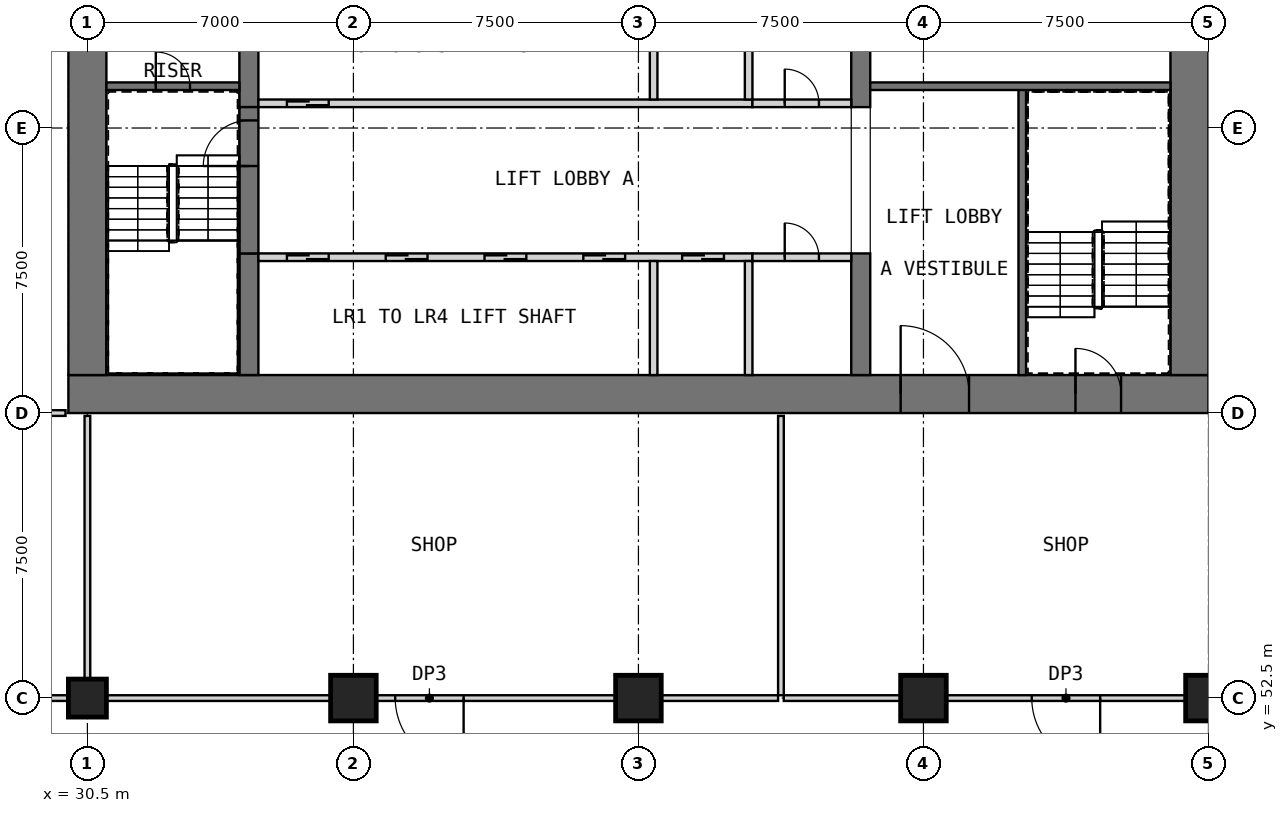
"""IFC4 building model, lengths in metres.
Left out: names, types, materials, properties, quantities, classifications, styles, units other than length and angle.
Written with IfcOpenShell. Run it as: python <this file> out.ifc"""

import sys

from ifc_helpers import new_model, si_unit, direction, frame, frame_2d, origin, origin_2d, place, context, subcontext, project, spatial, rectangle, extrude, element, fill, save


model = new_model("IFC4")
c1 = context("Model", 3, precision=1e-05, world=origin(), true_north=direction((0.0, 1.0)))
c2 = subcontext(c1, "Body", "Model", "MODEL_VIEW")
j1 = project(units=[si_unit("LENGTHUNIT", "METRE"), si_unit("PLANEANGLEUNIT", "RADIAN")], contexts=[c1])
p1 = place(None, origin())
s1 = spatial("IfcSite", under=j1, at=p1, CompositionType="ELEMENT")
p2 = place(p1, origin())
s2 = spatial("IfcBuilding", under=s1, at=p2, CompositionType="ELEMENT")
p3 = place(p2, frame((0.0, 0.0, 8.0)))
s3 = spatial("IfcBuildingStorey", under=s2, at=p3, CompositionType="ELEMENT", Elevation=8.0)
p4 = place(p3, frame((30.5, 52.5, 0.0), z_axis=(0.0, 0.0, 1.0), x_axis=(1.0, 0.0, 0.0)))
e1 = element("IfcColumn", 1, at=p4, inside=s3, PredefinedType="COLUMN", context=c2, shape_type="SweptSolid", body=[
    extrude(rectangle(XDim=1.0, YDim=1.0, at=origin_2d()), origin(), (0.0, 0.0, 1.0), 5.5),
])
for number, where, z_axis, x_axis in (
    (2, (37.5, 52.5, 0.0), (0.0, 0.0, 1.0), (1.0, 0.0, 0.0)),
    (3, (45.0, 52.5, 0.0), (0.0, 0.0, 1.0), (1.0, 0.0, 0.0)),
    (4, (52.5, 52.5, 0.0), (0.0, 0.0, 1.0), (1.0, 0.0, 0.0)),
    (5, (60.0, 52.5, 0.0), (0.0, 0.0, 1.0), (1.0, 0.0, 0.0)),
):
    element("IfcColumn", number, at=place(p3, frame(where, z_axis=z_axis, x_axis=x_axis)), inside=s3, PredefinedType="COLUMN", context=c2, shape_type="SweptSolid", body=[
        extrude(rectangle(XDim=1.2, YDim=1.2, at=origin_2d()), origin(), (0.0, 0.0, 1.0), 5.5),
    ])
p5 = place(p3, frame((30.0, 60.5, 0.0), z_axis=(0.0, 0.0, 1.0), x_axis=(1.0, 0.0, 0.0)))
e6 = element("IfcWall", 6, at=p5, inside=s3, PredefinedType="SHEAR", context=c2, shape_type="SweptSolid", body=[
    extrude(rectangle(XDim=30.0, YDim=1.0, at=frame_2d((15.0, 0.0))), origin(), (0.0, 0.0, 1.0), 5.5),
])
p6 = place(p5, frame((21.9, 0.0, 0.0)))
e7 = element("IfcOpeningElement", 7, at=p6, cuts=e6, PredefinedType="OPENING", context=c2, shape_type="SweptSolid", body=[
    extrude(rectangle(XDim=1.8, YDim=2.1, at=frame_2d((0.9, 1.05))), frame((0.0, 0.51, 0.0), z_axis=(0.0, -1.0, 0.0), x_axis=(1.0, 0.0, 0.0)), (0.0, 0.0, 1.0), 1.02),
])
p7 = place(p5, frame((26.5, 0.0, 0.0)))
e8 = element("IfcOpeningElement", 8, at=p7, cuts=e6, PredefinedType="OPENING", context=c2, shape_type="SweptSolid", body=[
    extrude(rectangle(XDim=1.2, YDim=2.1, at=frame_2d((0.6, 1.05))), frame((0.0, 0.51, 0.0), z_axis=(0.0, -1.0, 0.0), x_axis=(1.0, 0.0, 0.0)), (0.0, 0.0, 1.0), 1.02),
])
p8 = place(p3, frame((30.5, 61.0, 0.0), z_axis=(0.0, 0.0, 1.0), x_axis=(0.0, 1.0, 0.0)))
e9 = element("IfcWall", 9, at=p8, inside=s3, PredefinedType="SHEAR", context=c2, shape_type="SweptSolid", body=[
    extrude(rectangle(XDim=20.5, YDim=1.0, at=frame_2d((10.25, 0.0))), origin(), (0.0, 0.0, 1.0), 5.5),
])
p9 = place(p3, frame((59.5, 61.0, 0.0), z_axis=(0.0, 0.0, 1.0), x_axis=(0.0, 1.0, 0.0)))
e10 = element("IfcWall", 10, at=p9, inside=s3, PredefinedType="SHEAR", context=c2, shape_type="SweptSolid", body=[
    extrude(rectangle(XDim=20.5, YDim=1.0, at=frame_2d((10.25, 0.0))), origin(), (0.0, 0.0, 1.0), 5.5),
])
p10 = place(p9, frame((14.5, 0.0, 0.0)))
e11 = element("IfcOpeningElement", 11, at=p10, cuts=e10, PredefinedType="OPENING", context=c2, shape_type="SweptSolid", body=[
    extrude(rectangle(XDim=1.8, YDim=2.1, at=frame_2d((0.9, 1.05))), frame((0.0, 0.51, 0.0), z_axis=(0.0, -1.0, 0.0), x_axis=(1.0, 0.0, 0.0)), (0.0, 0.0, 1.0), 1.02),
])
p11 = place(p3, frame((34.75, 61.0, 0.0), z_axis=(0.0, 0.0, 1.0), x_axis=(0.0, 1.0, 0.0)))
e12 = element("IfcWall", 12, at=p11, inside=s3, PredefinedType="SHEAR", context=c2, shape_type="SweptSolid", body=[
    extrude(rectangle(XDim=3.2, YDim=0.5, at=frame_2d((1.6, 0.0))), origin(), (0.0, 0.0, 1.0), 5.5),
])
p12 = place(p3, frame((34.75, 68.05, 0.0), z_axis=(0.0, 0.0, 1.0), x_axis=(0.0, 1.0, 0.0)))
e13 = element("IfcWall", 13, at=p12, inside=s3, PredefinedType="SHEAR", context=c2, shape_type="SweptSolid", body=[
    extrude(rectangle(XDim=6.4, YDim=0.5, at=frame_2d((3.2, 0.0))), origin(), (0.0, 0.0, 1.0), 5.5),
])
p13 = place(p3, frame((50.85, 61.0, 0.0), z_axis=(0.0, 0.0, 1.0), x_axis=(0.0, 1.0, 0.0)))
e14 = element("IfcWall", 14, at=p13, inside=s3, PredefinedType="SHEAR", context=c2, shape_type="SweptSolid", body=[
    extrude(rectangle(XDim=3.2, YDim=0.5, at=frame_2d((1.6, 0.0))), origin(), (0.0, 0.0, 1.0), 5.5),
])
p14 = place(p3, frame((50.85, 68.05, 0.0), z_axis=(0.0, 0.0, 1.0), x_axis=(0.0, 1.0, 0.0)))
e15 = element("IfcWall", 15, at=p14, inside=s3, PredefinedType="SHEAR", context=c2, shape_type="SweptSolid", body=[
    extrude(rectangle(XDim=6.4, YDim=0.5, at=frame_2d((3.2, 0.0))), origin(), (0.0, 0.0, 1.0), 5.5),
])
p15 = place(p3, frame((35.0, 64.1, 0.0), z_axis=(0.0, 0.0, 1.0), x_axis=(1.0, 0.0, 0.0)))
e16 = element("IfcWall", 16, at=p15, inside=s3, PredefinedType="SOLIDWALL", context=c2, shape_type="SweptSolid", body=[
    extrude(rectangle(XDim=13.0, YDim=0.2, at=frame_2d((6.5, 0.0))), origin(), (0.0, 0.0, 1.0), 5.5),
])
p16 = place(p15, frame((0.75, 0.0, 0.0)))
e17 = element("IfcOpeningElement", 17, at=p16, cuts=e16, PredefinedType="OPENING", context=c2, shape_type="SweptSolid", body=[
    extrude(rectangle(XDim=1.1, YDim=2.1, at=frame_2d((0.55, 1.05))), frame((0.0, 0.11, 0.0), z_axis=(0.0, -1.0, 0.0), x_axis=(1.0, 0.0, 0.0)), (0.0, 0.0, 1.0), 0.22),
])
p17 = place(p15, frame((3.35, 0.0, 0.0)))
e18 = element("IfcOpeningElement", 18, at=p17, cuts=e16, PredefinedType="OPENING", context=c2, shape_type="SweptSolid", body=[
    extrude(rectangle(XDim=1.1, YDim=2.1, at=frame_2d((0.55, 1.05))), frame((0.0, 0.11, 0.0), z_axis=(0.0, -1.0, 0.0), x_axis=(1.0, 0.0, 0.0)), (0.0, 0.0, 1.0), 0.22),
])
p18 = place(p15, frame((5.95, 0.0, 0.0)))
e19 = element("IfcOpeningElement", 19, at=p18, cuts=e16, PredefinedType="OPENING", context=c2, shape_type="SweptSolid", body=[
    extrude(rectangle(XDim=1.1, YDim=2.1, at=frame_2d((0.55, 1.05))), frame((0.0, 0.11, 0.0), z_axis=(0.0, -1.0, 0.0), x_axis=(1.0, 0.0, 0.0)), (0.0, 0.0, 1.0), 0.22),
])
p19 = place(p15, frame((8.55, 0.0, 0.0)))
e20 = element("IfcOpeningElement", 20, at=p19, cuts=e16, PredefinedType="OPENING", context=c2, shape_type="SweptSolid", body=[
    extrude(rectangle(XDim=1.1, YDim=2.1, at=frame_2d((0.55, 1.05))), frame((0.0, 0.11, 0.0), z_axis=(0.0, -1.0, 0.0), x_axis=(1.0, 0.0, 0.0)), (0.0, 0.0, 1.0), 0.22),
])
p20 = place(p15, frame((11.15, 0.0, 0.0)))
e21 = element("IfcOpeningElement", 21, at=p20, cuts=e16, PredefinedType="OPENING", context=c2, shape_type="SweptSolid", body=[
    extrude(rectangle(XDim=1.1, YDim=2.1, at=frame_2d((0.55, 1.05))), frame((0.0, 0.11, 0.0), z_axis=(0.0, -1.0, 0.0), x_axis=(1.0, 0.0, 0.0)), (0.0, 0.0, 1.0), 0.22),
])
for number, where, z_axis, x_axis in (
    (22, (45.4, 61.0, 0.0), (0.0, 0.0, 1.0), (0.0, 1.0, 0.0)),
    (23, (47.9, 61.0, 0.0), (0.0, 0.0, 1.0), (0.0, 1.0, 0.0)),
):
    element("IfcWall", number, at=place(p3, frame(where, z_axis=z_axis, x_axis=x_axis)), inside=s3, PredefinedType="SOLIDWALL", context=c2, shape_type="SweptSolid", body=[
        extrude(rectangle(XDim=3.0, YDim=0.2, at=frame_2d((1.5, 0.0))), origin(), (0.0, 0.0, 1.0), 5.5),
    ])
p21 = place(p3, frame((48.0, 64.1, 0.0), z_axis=(0.0, 0.0, 1.0), x_axis=(1.0, 0.0, 0.0)))
e24 = element("IfcWall", 24, at=p21, inside=s3, PredefinedType="PARTITIONING", context=c2, shape_type="SweptSolid", body=[
    extrude(rectangle(XDim=2.6, YDim=0.2, at=frame_2d((1.3, 0.0))), origin(), (0.0, 0.0, 1.0), 5.2),
])
p22 = place(p21, frame((0.85, 0.0, 0.0)))
e25 = element("IfcOpeningElement", 25, at=p22, cuts=e24, PredefinedType="OPENING", context=c2, shape_type="SweptSolid", body=[
    extrude(rectangle(XDim=0.9, YDim=2.1, at=frame_2d((0.45, 1.05))), frame((0.0, 0.11, 0.0), z_axis=(0.0, -1.0, 0.0), x_axis=(1.0, 0.0, 0.0)), (0.0, 0.0, 1.0), 0.22),
])
p23 = place(p3, frame((35.0, 68.15, 0.0), z_axis=(0.0, 0.0, 1.0), x_axis=(1.0, 0.0, 0.0)))
e26 = element("IfcWall", 26, at=p23, inside=s3, PredefinedType="SOLIDWALL", context=c2, shape_type="SweptSolid", body=[
    extrude(rectangle(XDim=13.0, YDim=0.2, at=frame_2d((6.5, 0.0))), origin(), (0.0, 0.0, 1.0), 5.5),
])
p24 = place(p23, frame((0.75, 0.0, 0.0)))
e27 = element("IfcOpeningElement", 27, at=p24, cuts=e26, PredefinedType="OPENING", context=c2, shape_type="SweptSolid", body=[
    extrude(rectangle(XDim=1.1, YDim=2.1, at=frame_2d((0.55, 1.05))), frame((0.0, 0.11, 0.0), z_axis=(0.0, -1.0, 0.0), x_axis=(1.0, 0.0, 0.0)), (0.0, 0.0, 1.0), 0.22),
])
for number, where, z_axis, x_axis in (
    (28, (45.4, 68.25, 0.0), (0.0, 0.0, 1.0), (0.0, 1.0, 0.0)),
    (29, (47.9, 68.25, 0.0), (0.0, 0.0, 1.0), (0.0, 1.0, 0.0)),
):
    element("IfcWall", number, at=place(p3, frame(where, z_axis=z_axis, x_axis=x_axis)), inside=s3, PredefinedType="SOLIDWALL", context=c2, shape_type="SweptSolid", body=[
        extrude(rectangle(XDim=2.75, YDim=0.2, at=frame_2d((1.375, 0.0))), origin(), (0.0, 0.0, 1.0), 5.5),
    ])
p25 = place(p3, frame((48.0, 68.15, 0.0), z_axis=(0.0, 0.0, 1.0), x_axis=(1.0, 0.0, 0.0)))
e30 = element("IfcWall", 30, at=p25, inside=s3, PredefinedType="PARTITIONING", context=c2, shape_type="SweptSolid", body=[
    extrude(rectangle(XDim=2.6, YDim=0.2, at=frame_2d((1.3, 0.0))), origin(), (0.0, 0.0, 1.0), 5.2),
])
p26 = place(p25, frame((0.85, 0.0, 0.0)))
e31 = element("IfcOpeningElement", 31, at=p26, cuts=e30, PredefinedType="OPENING", context=c2, shape_type="SweptSolid", body=[
    extrude(rectangle(XDim=0.9, YDim=2.1, at=frame_2d((0.45, 1.05))), frame((0.0, 0.11, 0.0), z_axis=(0.0, -1.0, 0.0), x_axis=(1.0, 0.0, 0.0)), (0.0, 0.0, 1.0), 0.22),
])
p27 = place(p3, frame((34.75, 64.2, 0.0), z_axis=(0.0, 0.0, 1.0), x_axis=(0.0, 1.0, 0.0)))
e32 = element("IfcWall", 32, at=p27, inside=s3, PredefinedType="SOLIDWALL", context=c2, shape_type="SweptSolid", body=[
    extrude(rectangle(XDim=3.85, YDim=0.5, at=frame_2d((1.925, 0.0))), origin(), (0.0, 0.0, 1.0), 4.3),
])
p28 = place(p27, frame((2.3, 0.0, 0.0)))
e33 = element("IfcOpeningElement", 33, at=p28, cuts=e32, PredefinedType="OPENING", context=c2, shape_type="SweptSolid", body=[
    extrude(rectangle(XDim=1.2, YDim=2.1, at=frame_2d((0.6, 1.05))), frame((0.0, 0.26, 0.0), z_axis=(0.0, -1.0, 0.0), x_axis=(1.0, 0.0, 0.0)), (0.0, 0.0, 1.0), 0.52),
])
p29 = place(p3, frame((31.0, 68.6, 0.0), z_axis=(0.0, 0.0, 1.0), x_axis=(1.0, 0.0, 0.0)))
e34 = element("IfcWall", 34, at=p29, inside=s3, PredefinedType="SOLIDWALL", context=c2, shape_type="SweptSolid", body=[
    extrude(rectangle(XDim=3.5, YDim=0.2, at=frame_2d((1.75, 0.0))), origin(), (0.0, 0.0, 1.0), 5.2),
])
p30 = place(p29, frame((1.3, 0.0, 0.0)))
e35 = element("IfcOpeningElement", 35, at=p30, cuts=e34, PredefinedType="OPENING", context=c2, shape_type="SweptSolid", body=[
    extrude(rectangle(XDim=0.9, YDim=2.1, at=frame_2d((0.45, 1.05))), frame((0.0, 0.11, 0.0), z_axis=(0.0, -1.0, 0.0), x_axis=(1.0, 0.0, 0.0)), (0.0, 0.0, 1.0), 0.22),
])
p31 = place(p3, frame((55.1, 61.0, 0.0), z_axis=(0.0, 0.0, 1.0), x_axis=(0.0, 1.0, 0.0)))
e36 = element("IfcWall", 36, at=p31, inside=s3, PredefinedType="SOLIDWALL", context=c2, shape_type="SweptSolid", body=[
    extrude(rectangle(XDim=7.6, YDim=0.2, at=frame_2d((3.8, 0.0))), origin(), (0.0, 0.0, 1.0), 5.2),
])
p32 = place(p3, frame((51.1, 68.6, 0.0), z_axis=(0.0, 0.0, 1.0), x_axis=(1.0, 0.0, 0.0)))
e37 = element("IfcWall", 37, at=p32, inside=s3, PredefinedType="SOLIDWALL", context=c2, shape_type="SweptSolid", body=[
    extrude(rectangle(XDim=7.9, YDim=0.2, at=frame_2d((3.95, 0.0))), origin(), (0.0, 0.0, 1.0), 5.2),
])
p33 = place(p3, frame((23.6, 52.5, 0.0), z_axis=(0.0, 0.0, 1.0), x_axis=(1.0, 0.0, 0.0)))
e38 = element("IfcWall", 38, at=p33, inside=s3, PredefinedType="PARTITIONING", context=c2, shape_type="SweptSolid", body=[
    extrude(rectangle(XDim=6.4, YDim=0.15, at=frame_2d((3.2, 0.0))), origin(), (0.0, 0.0, 1.0), 5.2),
])
p34 = place(p3, frame((31.0, 52.5, 0.0), z_axis=(0.0, 0.0, 1.0), x_axis=(1.0, 0.0, 0.0)))
e39 = element("IfcWall", 39, at=p34, inside=s3, PredefinedType="PARTITIONING", context=c2, shape_type="SweptSolid", body=[
    extrude(rectangle(XDim=5.9, YDim=0.15, at=frame_2d((2.95, 0.0))), origin(), (0.0, 0.0, 1.0), 5.2),
])
p35 = place(p3, frame((44.4, 52.5, 0.0), z_axis=(0.0, 0.0, 1.0), x_axis=(-1.0, 0.0, 0.0)))
e40 = element("IfcWall", 40, at=p35, inside=s3, PredefinedType="PARTITIONING", context=c2, shape_type="SweptSolid", body=[
    extrude(rectangle(XDim=6.3, YDim=0.15, at=frame_2d((3.15, 0.0))), origin(), (0.0, 0.0, 1.0), 5.2),
])
p36 = place(p35, frame((4.0, 0.0, 0.0)))
e41 = element("IfcOpeningElement", 41, at=p36, cuts=e40, PredefinedType="OPENING", context=c2, shape_type="SweptSolid", body=[
    extrude(rectangle(XDim=1.8, YDim=2.4, at=frame_2d((0.9, 1.2))), frame((0.0, 0.085, 0.0), z_axis=(0.0, -1.0, 0.0), x_axis=(1.0, 0.0, 0.0)), (0.0, 0.0, 1.0), 0.17),
])
for number, where, z_axis, x_axis in (
    (42, (45.6, 52.5, 0.0), (0.0, 0.0, 1.0), (1.0, 0.0, 0.0)),
    (43, (48.825, 52.5, 0.0), (0.0, 0.0, 1.0), (1.0, 0.0, 0.0)),
):
    element("IfcWall", number, at=place(p3, frame(where, z_axis=z_axis, x_axis=x_axis)), inside=s3, PredefinedType="PARTITIONING", context=c2, shape_type="SweptSolid", body=[
        extrude(rectangle(XDim=3.075, YDim=0.15, at=frame_2d((1.538, 0.0))), origin(), (0.0, 0.0, 1.0), 5.2),
    ])
p37 = place(p3, frame((59.4, 52.5, 0.0), z_axis=(0.0, 0.0, 1.0), x_axis=(-1.0, 0.0, 0.0)))
e44 = element("IfcWall", 44, at=p37, inside=s3, PredefinedType="PARTITIONING", context=c2, shape_type="SweptSolid", body=[
    extrude(rectangle(XDim=6.3, YDim=0.15, at=frame_2d((3.15, 0.0))), origin(), (0.0, 0.0, 1.0), 5.2),
])
p38 = place(p37, frame((2.25, 0.0, 0.0)))
e45 = element("IfcOpeningElement", 45, at=p38, cuts=e44, PredefinedType="OPENING", context=c2, shape_type="SweptSolid", body=[
    extrude(rectangle(XDim=1.8, YDim=2.4, at=frame_2d((0.9, 1.2))), frame((0.0, 0.085, 0.0), z_axis=(0.0, -1.0, 0.0), x_axis=(1.0, 0.0, 0.0)), (0.0, 0.0, 1.0), 0.17),
])
p39 = place(p3, frame((23.6, 60.0, 0.0), z_axis=(0.0, 0.0, 1.0), x_axis=(1.0, 0.0, 0.0)))
e46 = element("IfcWall", 46, at=p39, inside=s3, PredefinedType="PARTITIONING", context=c2, shape_type="SweptSolid", body=[
    extrude(rectangle(XDim=6.325, YDim=0.15, at=frame_2d((3.163, 0.0))), origin(), (0.0, 0.0, 1.0), 5.2),
])
p40 = place(p3, frame((30.5, 53.0, 0.0), z_axis=(0.0, 0.0, 1.0), x_axis=(0.0, 1.0, 0.0)))
e47 = element("IfcWall", 47, at=p40, inside=s3, PredefinedType="PARTITIONING", context=c2, shape_type="SweptSolid", body=[
    extrude(rectangle(XDim=6.925, YDim=0.15, at=frame_2d((3.462, 0.0))), origin(), (0.0, 0.0, 1.0), 5.2),
])
p41 = place(p3, frame((48.75, 52.575, 0.0), z_axis=(0.0, 0.0, 1.0), x_axis=(0.0, 1.0, 0.0)))
e48 = element("IfcWall", 48, at=p41, inside=s3, PredefinedType="PARTITIONING", context=c2, shape_type="SweptSolid", body=[
    extrude(rectangle(XDim=7.35, YDim=0.15, at=frame_2d((3.675, 0.0))), origin(), (0.0, 0.0, 1.0), 5.2),
])
p42 = place(p16, origin())
e49 = element("IfcDoor", 49, at=p42, inside=s3, OperationType="DOUBLE_DOOR_SLIDING", PredefinedType="DOOR", context=c2, shape_type="SweptSolid", body=[
    extrude(rectangle(XDim=1.1, YDim=2.1, at=frame_2d((0.55, 1.05))), frame((0.0, 0.025, 0.0), z_axis=(0.0, -1.0, 0.0), x_axis=(1.0, 0.0, 0.0)), (0.0, 0.0, 1.0), 0.05),
])
fill(e17, e49)
p43 = place(p17, origin())
e50 = element("IfcDoor", 50, at=p43, inside=s3, OperationType="DOUBLE_DOOR_SLIDING", PredefinedType="DOOR", context=c2, shape_type="SweptSolid", body=[
    extrude(rectangle(XDim=1.1, YDim=2.1, at=frame_2d((0.55, 1.05))), frame((0.0, 0.025, 0.0), z_axis=(0.0, -1.0, 0.0), x_axis=(1.0, 0.0, 0.0)), (0.0, 0.0, 1.0), 0.05),
])
fill(e18, e50)
p44 = place(p18, origin())
e51 = element("IfcDoor", 51, at=p44, inside=s3, OperationType="DOUBLE_DOOR_SLIDING", PredefinedType="DOOR", context=c2, shape_type="SweptSolid", body=[
    extrude(rectangle(XDim=1.1, YDim=2.1, at=frame_2d((0.55, 1.05))), frame((0.0, 0.025, 0.0), z_axis=(0.0, -1.0, 0.0), x_axis=(1.0, 0.0, 0.0)), (0.0, 0.0, 1.0), 0.05),
])
fill(e19, e51)
p45 = place(p19, origin())
e52 = element("IfcDoor", 52, at=p45, inside=s3, OperationType="DOUBLE_DOOR_SLIDING", PredefinedType="DOOR", context=c2, shape_type="SweptSolid", body=[
    extrude(rectangle(XDim=1.1, YDim=2.1, at=frame_2d((0.55, 1.05))), frame((0.0, 0.025, 0.0), z_axis=(0.0, -1.0, 0.0), x_axis=(1.0, 0.0, 0.0)), (0.0, 0.0, 1.0), 0.05),
])
fill(e20, e52)
p46 = place(p20, origin())
e53 = element("IfcDoor", 53, at=p46, inside=s3, OperationType="DOUBLE_DOOR_SLIDING", PredefinedType="DOOR", context=c2, shape_type="SweptSolid", body=[
    extrude(rectangle(XDim=1.1, YDim=2.1, at=frame_2d((0.55, 1.05))), frame((0.0, 0.025, 0.0), z_axis=(0.0, -1.0, 0.0), x_axis=(1.0, 0.0, 0.0)), (0.0, 0.0, 1.0), 0.05),
])
fill(e21, e53)
p47 = place(p22, origin())
e54 = element("IfcDoor", 54, at=p47, inside=s3, OperationType="SINGLE_SWING_LEFT", PredefinedType="DOOR", context=c2, shape_type="SweptSolid", body=[
    extrude(rectangle(XDim=0.9, YDim=2.1, at=frame_2d((0.45, 1.05))), frame((0.0, 0.025, 0.0), z_axis=(0.0, -1.0, 0.0), x_axis=(1.0, 0.0, 0.0)), (0.0, 0.0, 1.0), 0.05),
])
fill(e25, e54)
p48 = place(p24, origin())
e55 = element("IfcDoor", 55, at=p48, inside=s3, OperationType="DOUBLE_DOOR_SLIDING", PredefinedType="DOOR", context=c2, shape_type="SweptSolid", body=[
    extrude(rectangle(XDim=1.1, YDim=2.1, at=frame_2d((0.55, 1.05))), frame((0.0, 0.025, 0.0), z_axis=(0.0, -1.0, 0.0), x_axis=(1.0, 0.0, 0.0)), (0.0, 0.0, 1.0), 0.05),
])
fill(e27, e55)
p49 = place(p26, origin())
e56 = element("IfcDoor", 56, at=p49, inside=s3, OperationType="SINGLE_SWING_LEFT", PredefinedType="DOOR", context=c2, shape_type="SweptSolid", body=[
    extrude(rectangle(XDim=0.9, YDim=2.1, at=frame_2d((0.45, 1.05))), frame((0.0, 0.025, 0.0), z_axis=(0.0, -1.0, 0.0), x_axis=(1.0, 0.0, 0.0)), (0.0, 0.0, 1.0), 0.05),
])
fill(e31, e56)
p50 = place(p6, origin())
e57 = element("IfcDoor", 57, at=p50, inside=s3, OperationType="DOUBLE_DOOR_SINGLE_SWING", PredefinedType="DOOR", context=c2, shape_type="SweptSolid", body=[
    extrude(rectangle(XDim=1.8, YDim=2.1, at=frame_2d((0.9, 1.05))), frame((0.0, 0.025, 0.0), z_axis=(0.0, -1.0, 0.0), x_axis=(1.0, 0.0, 0.0)), (0.0, 0.0, 1.0), 0.05),
])
fill(e7, e57)
p51 = place(p28, origin())
e58 = element("IfcDoor", 58, at=p51, inside=s3, OperationType="SINGLE_SWING_LEFT", PredefinedType="DOOR", context=c2, shape_type="SweptSolid", body=[
    extrude(rectangle(XDim=1.2, YDim=2.1, at=frame_2d((0.6, 1.05))), frame((0.0, 0.025, 0.0), z_axis=(0.0, -1.0, 0.0), x_axis=(1.0, 0.0, 0.0)), (0.0, 0.0, 1.0), 0.05),
])
fill(e33, e58)
p52 = place(p30, origin())
e59 = element("IfcDoor", 59, at=p52, inside=s3, OperationType="SINGLE_SWING_LEFT", PredefinedType="DOOR", context=c2, shape_type="SweptSolid", body=[
    extrude(rectangle(XDim=0.9, YDim=2.1, at=frame_2d((0.45, 1.05))), frame((0.0, 0.025, 0.0), z_axis=(0.0, -1.0, 0.0), x_axis=(1.0, 0.0, 0.0)), (0.0, 0.0, 1.0), 0.05),
])
fill(e35, e59)
p53 = place(p7, origin())
e60 = element("IfcDoor", 60, at=p53, inside=s3, OperationType="SINGLE_SWING_LEFT", PredefinedType="DOOR", context=c2, shape_type="SweptSolid", body=[
    extrude(rectangle(XDim=1.2, YDim=2.1, at=frame_2d((0.6, 1.05))), frame((0.0, 0.025, 0.0), z_axis=(0.0, -1.0, 0.0), x_axis=(1.0, 0.0, 0.0)), (0.0, 0.0, 1.0), 0.05),
])
fill(e8, e60)
p54 = place(p36, origin())
e61 = element("IfcDoor", 61, at=p54, inside=s3, OperationType="SINGLE_SWING_LEFT", PredefinedType="DOOR", context=c2, shape_type="SweptSolid", body=[
    extrude(rectangle(XDim=1.8, YDim=2.4, at=frame_2d((0.9, 1.2))), frame((0.0, 0.025, 0.0), z_axis=(0.0, -1.0, 0.0), x_axis=(1.0, 0.0, 0.0)), (0.0, 0.0, 1.0), 0.05),
])
fill(e41, e61)
p55 = place(p38, origin())
e62 = element("IfcDoor", 62, at=p55, inside=s3, OperationType="SINGLE_SWING_LEFT", PredefinedType="DOOR", context=c2, shape_type="SweptSolid", body=[
    extrude(rectangle(XDim=1.8, YDim=2.4, at=frame_2d((0.9, 1.2))), frame((0.0, 0.025, 0.0), z_axis=(0.0, -1.0, 0.0), x_axis=(1.0, 0.0, 0.0)), (0.0, 0.0, 1.0), 0.05),
])
fill(e45, e62)
save(model, sys.argv[1])
